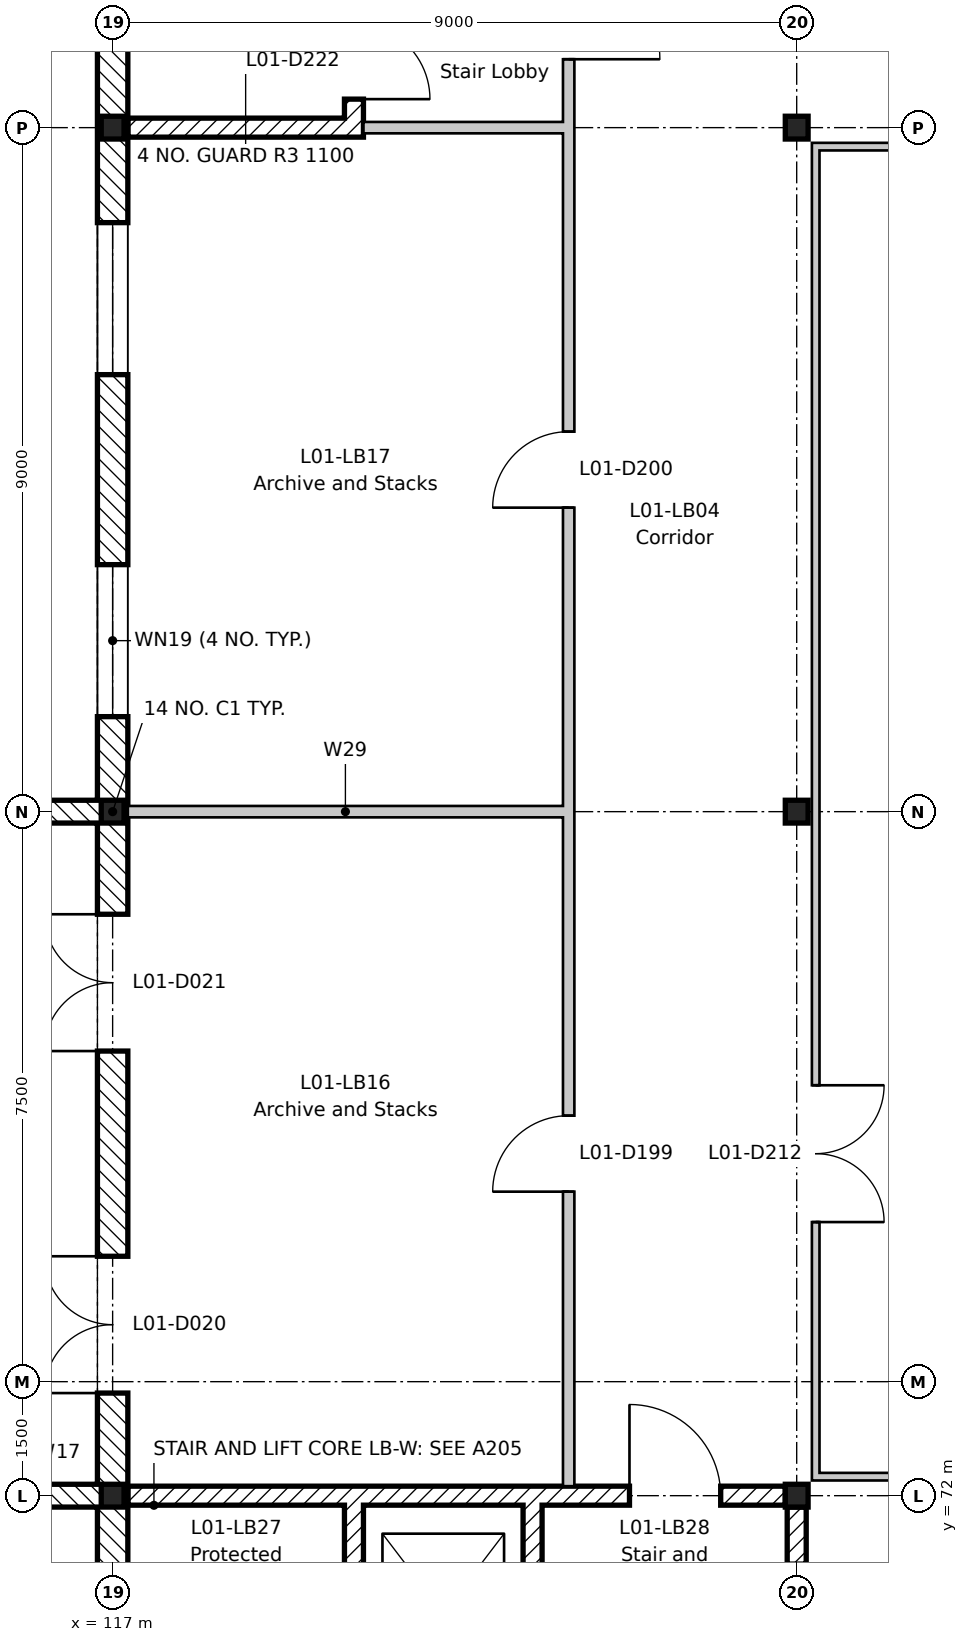
"""IFC4 building model, lengths in metres.
Left out: names, types, materials, properties, quantities, classifications, styles, units other than length and angle.
Written with IfcOpenShell. Run it as: python <this file> out.ifc"""

import sys

from ifc_helpers import new_model, si_unit, direction, frame, frame_2d, origin, origin_2d, place, context, subcontext, project, spatial, rectangle, i_section, extrude, element, fill, save


model = new_model("IFC4")
c1 = context("Model", 3, precision=1e-05, world=origin(), true_north=direction((0.0, 1.0)))
c2 = subcontext(c1, "Body", "Model", "MODEL_VIEW")
j1 = project(units=[si_unit("LENGTHUNIT", "METRE"), si_unit("PLANEANGLEUNIT", "RADIAN")], contexts=[c1])
p1 = place(None, origin())
s1 = spatial("IfcSite", under=j1, at=p1, CompositionType="ELEMENT")
p2 = place(p1, origin())
s2 = spatial("IfcBuilding", under=s1, at=p2, CompositionType="ELEMENT")
p3 = place(p2, frame((0.0, 0.0, 5.4)))
s3 = spatial("IfcBuildingStorey", under=s2, at=p3, CompositionType="ELEMENT", Elevation=5.4)
for number, where, z_axis, x_axis in (
    (1, (117.0, 72.0, -0.2), (0.0, 0.0, 1.0), (1.0, 0.0, 0.0)),
    (2, (117.0, 81.0, -0.2), (0.0, 0.0, 1.0), (1.0, 0.0, 0.0)),
    (3, (117.0, 90.0, -0.2), (0.0, 0.0, 1.0), (1.0, 0.0, 0.0)),
    (4, (126.0, 72.0, -0.2), (0.0, 0.0, 1.0), (1.0, 0.0, 0.0)),
    (5, (126.0, 81.0, -0.2), (0.0, 0.0, 1.0), (1.0, 0.0, 0.0)),
    (6, (126.0, 90.0, -0.2), (0.0, 0.0, 1.0), (1.0, 0.0, 0.0)),
):
    element("IfcColumn", number, at=place(p3, frame(where, z_axis=z_axis, x_axis=x_axis)), inside=s3, PredefinedType="COLUMN", context=c2, shape_type="SweptSolid", body=[
        extrude(i_section(OverallWidth=0.3, OverallDepth=0.3, WebThickness=0.011, FlangeThickness=0.019, FilletRadius=0.027, at=origin_2d()), origin(), (0.0, 0.0, 1.0), 4.5),
    ])
p4 = place(p3, frame((120.175, 63.2, 0.0), z_axis=(0.0, 0.0, 1.0), x_axis=(0.0, 1.0, 0.0)))
e7 = element("IfcWall", 7, at=p4, inside=s3, PredefinedType="SHEAR", context=c2, shape_type="SweptSolid", body=[
    extrude(rectangle(XDim=8.675, YDim=0.25, at=frame_2d((4.337, 0.0))), origin(), (0.0, 0.0, 1.0), 4.3),
])
p5 = place(p4, frame((0.25, 0.0, 0.0)))
e8 = element("IfcOpeningElement", 8, at=p5, cuts=e7, PredefinedType="OPENING", context=c2, shape_type="SweptSolid", body=[
    extrude(rectangle(XDim=1.0, YDim=2.1, at=frame_2d((0.5, 1.05))), frame((0.0, 0.135, 0.0), z_axis=(0.0, -1.0, 0.0), x_axis=(1.0, 0.0, 0.0)), (0.0, 0.0, 1.0), 0.27),
])
p6 = place(p3, frame((126.0, 63.2, 0.0), z_axis=(0.0, 0.0, 1.0), x_axis=(0.0, 1.0, 0.0)))
e9 = element("IfcWall", 9, at=p6, inside=s3, PredefinedType="SHEAR", context=c2, shape_type="SweptSolid", body=[
    extrude(rectangle(XDim=8.65, YDim=0.25, at=frame_2d((4.325, 0.0))), origin(), (0.0, 0.0, 1.0), 4.3),
])
p7 = place(p6, frame((6.7, 0.0, 0.0)))
e10 = element("IfcOpeningElement", 10, at=p7, cuts=e9, PredefinedType="OPENING", context=c2, shape_type="SweptSolid", body=[
    extrude(rectangle(XDim=1.2, YDim=2.1, at=frame_2d((0.6, 1.05))), frame((0.0, 0.135, 0.0), z_axis=(0.0, -1.0, 0.0), x_axis=(1.0, 0.0, 0.0)), (0.0, 0.0, 1.0), 0.27),
])
p8 = place(p3, frame((117.2, 72.0, 0.0), z_axis=(0.0, 0.0, 1.0), x_axis=(1.0, 0.0, 0.0)))
e11 = element("IfcWall", 11, at=p8, inside=s3, PredefinedType="SHEAR", context=c2, shape_type="SweptSolid", body=[
    extrude(rectangle(XDim=8.65, YDim=0.25, at=frame_2d((4.325, 0.0))), origin(), (0.0, 0.0, 1.0), 4.3),
])
p9 = place(p8, frame((6.6, 0.0, 0.0)))
e12 = element("IfcOpeningElement", 12, at=p9, cuts=e11, PredefinedType="OPENING", context=c2, shape_type="SweptSolid", body=[
    extrude(rectangle(XDim=1.2, YDim=2.1, at=frame_2d((0.6, 1.05))), frame((0.0, 0.135, 0.0), z_axis=(0.0, -1.0, 0.0), x_axis=(1.0, 0.0, 0.0)), (0.0, 0.0, 1.0), 0.27),
])
p10 = place(p3, frame((122.525, 69.275, 0.0), z_axis=(0.0, 0.0, 1.0), x_axis=(0.0, 1.0, 0.0)))
e13 = element("IfcWall", 13, at=p10, inside=s3, PredefinedType="SHEAR", context=c2, shape_type="SweptSolid", body=[
    extrude(rectangle(XDim=2.6, YDim=0.25, at=frame_2d((1.3, 0.0))), origin(), (0.0, 0.0, 1.0), 4.3),
])
p11 = place(p3, frame((120.175, 90.125, 0.0), z_axis=(0.0, 0.0, 1.0), x_axis=(0.0, 1.0, 0.0)))
e14 = element("IfcWall", 14, at=p11, inside=s3, PredefinedType="SHEAR", context=c2, shape_type="SweptSolid", body=[
    extrude(rectangle(XDim=8.675, YDim=0.25, at=frame_2d((4.337, 0.0))), origin(), (0.0, 0.0, 1.0), 4.3),
])
p12 = place(p11, frame((0.25, 0.0, 0.0)))
e15 = element("IfcOpeningElement", 15, at=p12, cuts=e14, PredefinedType="OPENING", context=c2, shape_type="SweptSolid", body=[
    extrude(rectangle(XDim=1.0, YDim=2.1, at=frame_2d((0.5, 1.05))), frame((0.0, 0.135, 0.0), z_axis=(0.0, -1.0, 0.0), x_axis=(1.0, 0.0, 0.0)), (0.0, 0.0, 1.0), 0.27),
])
p13 = place(p3, frame((117.2, 90.0, 0.0), z_axis=(0.0, 0.0, 1.0), x_axis=(1.0, 0.0, 0.0)))
e16 = element("IfcWall", 16, at=p13, inside=s3, PredefinedType="SHEAR", context=c2, shape_type="SweptSolid", body=[
    extrude(rectangle(XDim=3.1, YDim=0.25, at=frame_2d((1.55, 0.0))), origin(), (0.0, 0.0, 1.0), 3.8),
])
for number, where, z_axis, x_axis in (
    (17, (116.85, 72.0, 0.0), (0.0, 0.0, 1.0), (-1.0, 0.0, 0.0)),
    (18, (116.85, 81.0, 0.0), (0.0, 0.0, 1.0), (-1.0, 0.0, 0.0)),
):
    element("IfcWall", number, at=place(p3, frame(where, z_axis=z_axis, x_axis=x_axis)), inside=s3, PredefinedType="STANDARD", context=c2, shape_type="SweptSolid", body=[
        extrude(rectangle(XDim=2.25, YDim=0.3, at=frame_2d((1.125, 0.0))), origin(), (0.0, 0.0, 1.0), 3.97),
    ])
p14 = place(p3, frame((117.0, 63.2, 0.0), z_axis=(0.0, 0.0, 1.0), x_axis=(0.0, 1.0, 0.0)))
e19 = element("IfcWall", 19, at=p14, inside=s3, PredefinedType="STANDARD", context=c2, shape_type="SweptSolid", body=[
    extrude(rectangle(XDim=35.6, YDim=0.4, at=frame_2d((17.8, 0.0))), origin(), (0.0, 0.0, 1.0), 4.3),
])
p15 = place(p14, frame((19.05, 0.0, 0.5)))
e20 = element("IfcOpeningElement", 20, at=p15, cuts=e19, PredefinedType="OPENING", context=c2, shape_type="SweptSolid", body=[
    extrude(rectangle(XDim=2.0, YDim=3.2, at=frame_2d((1.0, 1.6))), frame((0.0, 0.21, 0.0), z_axis=(0.0, -1.0, 0.0), x_axis=(1.0, 0.0, 0.0)), (0.0, 0.0, 1.0), 0.42),
])
p16 = place(p14, frame((23.55, 0.0, 0.5)))
e21 = element("IfcOpeningElement", 21, at=p16, cuts=e19, PredefinedType="OPENING", context=c2, shape_type="SweptSolid", body=[
    extrude(rectangle(XDim=2.0, YDim=3.2, at=frame_2d((1.0, 1.6))), frame((0.0, 0.21, 0.0), z_axis=(0.0, -1.0, 0.0), x_axis=(1.0, 0.0, 0.0)), (0.0, 0.0, 1.0), 0.42),
])
p17 = place(p14, frame((28.05, 0.0, 0.5)))
e22 = element("IfcOpeningElement", 22, at=p17, cuts=e19, PredefinedType="OPENING", context=c2, shape_type="SweptSolid", body=[
    extrude(rectangle(XDim=2.0, YDim=3.2, at=frame_2d((1.0, 1.6))), frame((0.0, 0.21, 0.0), z_axis=(0.0, -1.0, 0.0), x_axis=(1.0, 0.0, 0.0)), (0.0, 0.0, 1.0), 0.42),
])
p18 = place(p14, frame((32.55, 0.0, 0.5)))
e23 = element("IfcOpeningElement", 23, at=p18, cuts=e19, PredefinedType="OPENING", context=c2, shape_type="SweptSolid", body=[
    extrude(rectangle(XDim=2.0, YDim=3.2, at=frame_2d((1.0, 1.6))), frame((0.0, 0.21, 0.0), z_axis=(0.0, -1.0, 0.0), x_axis=(1.0, 0.0, 0.0)), (0.0, 0.0, 1.0), 0.42),
])
p19 = place(p14, frame((10.15, 0.0, 0.0)))
e24 = element("IfcOpeningElement", 24, at=p19, cuts=e19, PredefinedType="OPENING", context=c2, shape_type="SweptSolid", body=[
    extrude(rectangle(XDim=1.8, YDim=2.4, at=frame_2d((0.9, 1.2))), frame((0.0, 0.21, 0.0), z_axis=(0.0, -1.0, 0.0), x_axis=(1.0, 0.0, 0.0)), (0.0, 0.0, 1.0), 0.42),
])
p20 = place(p14, frame((14.65, 0.0, 0.0)))
e25 = element("IfcOpeningElement", 25, at=p20, cuts=e19, PredefinedType="OPENING", context=c2, shape_type="SweptSolid", body=[
    extrude(rectangle(XDim=1.8, YDim=2.4, at=frame_2d((0.9, 1.2))), frame((0.0, 0.21, 0.0), z_axis=(0.0, -1.0, 0.0), x_axis=(1.0, 0.0, 0.0)), (0.0, 0.0, 1.0), 0.42),
])
p21 = place(p3, frame((117.2, 81.0, 0.0), z_axis=(0.0, 0.0, 1.0), x_axis=(1.0, 0.0, 0.0)))
e26 = element("IfcWall", 26, at=p21, inside=s3, PredefinedType="PARTITIONING", context=c2, shape_type="SweptSolid", body=[
    extrude(rectangle(XDim=5.725, YDim=0.15, at=frame_2d((2.863, 0.0))), origin(), (0.0, 0.0, 1.0), 3.78),
])
p22 = place(p3, frame((120.3, 90.0, 0.0), z_axis=(0.0, 0.0, 1.0), x_axis=(1.0, 0.0, 0.0)))
e27 = element("IfcWall", 27, at=p22, inside=s3, PredefinedType="PARTITIONING", context=c2, shape_type="SweptSolid", body=[
    extrude(rectangle(XDim=2.625, YDim=0.15, at=frame_2d((1.312, 0.0))), origin(), (0.0, 0.0, 1.0), 3.78),
])
p23 = place(p3, frame((123.0, 72.125, 0.0), z_axis=(0.0, 0.0, 1.0), x_axis=(0.0, 1.0, 0.0)))
e28 = element("IfcWall", 28, at=p23, inside=s3, PredefinedType="PARTITIONING", context=c2, shape_type="SweptSolid", body=[
    extrude(rectangle(XDim=20.8, YDim=0.15, at=frame_2d((10.4, 0.0))), origin(), (0.0, 0.0, 1.0), 3.78),
])
p24 = place(p23, frame((3.875, 0.0, 0.0)))
e29 = element("IfcOpeningElement", 29, at=p24, cuts=e28, PredefinedType="OPENING", context=c2, shape_type="SweptSolid", body=[
    extrude(rectangle(XDim=1.0, YDim=2.1, at=frame_2d((0.5, 1.05))), frame((0.0, 0.085, 0.0), z_axis=(0.0, -1.0, 0.0), x_axis=(1.0, 0.0, 0.0)), (0.0, 0.0, 1.0), 0.17),
])
p25 = place(p23, frame((12.875, 0.0, 0.0)))
e30 = element("IfcOpeningElement", 30, at=p25, cuts=e28, PredefinedType="OPENING", context=c2, shape_type="SweptSolid", body=[
    extrude(rectangle(XDim=1.0, YDim=2.1, at=frame_2d((0.5, 1.05))), frame((0.0, 0.085, 0.0), z_axis=(0.0, -1.0, 0.0), x_axis=(1.0, 0.0, 0.0)), (0.0, 0.0, 1.0), 0.17),
])
p26 = place(p23, frame((18.775, 0.0, 0.0)))
e31 = element("IfcOpeningElement", 31, at=p26, cuts=e28, PredefinedType="OPENING", context=c2, shape_type="SweptSolid", body=[
    extrude(rectangle(XDim=1.2, YDim=2.1, at=frame_2d((0.6, 1.05))), frame((0.0, 0.085, 0.0), z_axis=(0.0, -1.0, 0.0), x_axis=(1.0, 0.0, 0.0)), (0.0, 0.0, 1.0), 0.17),
])
p27 = place(p3, frame((126.2, 72.25, 0.0), z_axis=(0.0, 0.0, 1.0), x_axis=(1.0, 0.0, 0.0)))
e32 = element("IfcWall", 32, at=p27, inside=s3, PredefinedType="PARTITIONING", context=c2, shape_type="SweptSolid", body=[
    extrude(rectangle(XDim=35.6, YDim=0.1, at=frame_2d((17.8, 0.0))), origin(), (0.0, 0.0, 1.0), 4.3),
])
p28 = place(p27, frame((3.4, 0.0, 0.0)))
e33 = element("IfcOpeningElement", 33, at=p28, cuts=e32, PredefinedType="OPENING", context=c2, shape_type="SweptSolid", body=[
    extrude(rectangle(XDim=1.8, YDim=2.1, at=frame_2d((0.9, 1.05))), frame((0.0, 0.06, 0.0), z_axis=(0.0, -1.0, 0.0), x_axis=(1.0, 0.0, 0.0)), (0.0, 0.0, 1.0), 0.12),
])
p29 = place(p27, frame((13.9, 0.0, 0.0)))
e34 = element("IfcOpeningElement", 34, at=p29, cuts=e32, PredefinedType="OPENING", context=c2, shape_type="SweptSolid", body=[
    extrude(rectangle(XDim=1.8, YDim=2.1, at=frame_2d((0.9, 1.05))), frame((0.0, 0.06, 0.0), z_axis=(0.0, -1.0, 0.0), x_axis=(1.0, 0.0, 0.0)), (0.0, 0.0, 1.0), 0.12),
])
p30 = place(p3, frame((126.2, 89.75, 0.0), z_axis=(0.0, 0.0, 1.0), x_axis=(1.0, 0.0, 0.0)))
e35 = element("IfcWall", 35, at=p30, inside=s3, PredefinedType="PARTITIONING", context=c2, shape_type="SweptSolid", body=[
    extrude(rectangle(XDim=35.6, YDim=0.1, at=frame_2d((17.8, 0.0))), origin(), (0.0, 0.0, 1.0), 4.3),
])
p31 = place(p30, frame((21.4, 0.0, 0.0)))
e36 = element("IfcOpeningElement", 36, at=p31, cuts=e35, PredefinedType="OPENING", context=c2, shape_type="SweptSolid", body=[
    extrude(rectangle(XDim=1.8, YDim=2.1, at=frame_2d((0.9, 1.05))), frame((0.0, 0.06, 0.0), z_axis=(0.0, -1.0, 0.0), x_axis=(1.0, 0.0, 0.0)), (0.0, 0.0, 1.0), 0.12),
])
p32 = place(p30, frame((30.4, 0.0, 0.0)))
e37 = element("IfcOpeningElement", 37, at=p32, cuts=e35, PredefinedType="OPENING", context=c2, shape_type="SweptSolid", body=[
    extrude(rectangle(XDim=1.8, YDim=2.1, at=frame_2d((0.9, 1.05))), frame((0.0, 0.06, 0.0), z_axis=(0.0, -1.0, 0.0), x_axis=(1.0, 0.0, 0.0)), (0.0, 0.0, 1.0), 0.12),
])
p33 = place(p3, frame((126.25, 72.3, 0.0), z_axis=(0.0, 0.0, 1.0), x_axis=(0.0, 1.0, 0.0)))
e38 = element("IfcWall", 38, at=p33, inside=s3, PredefinedType="PARTITIONING", context=c2, shape_type="SweptSolid", body=[
    extrude(rectangle(XDim=17.4, YDim=0.1, at=frame_2d((8.7, 0.0))), origin(), (0.0, 0.0, 1.0), 4.3),
])
p34 = place(p33, frame((3.3, 0.0, 0.0)))
e39 = element("IfcOpeningElement", 39, at=p34, cuts=e38, PredefinedType="OPENING", context=c2, shape_type="SweptSolid", body=[
    extrude(rectangle(XDim=1.8, YDim=2.1, at=frame_2d((0.9, 1.05))), frame((0.0, 0.06, 0.0), z_axis=(0.0, -1.0, 0.0), x_axis=(1.0, 0.0, 0.0)), (0.0, 0.0, 1.0), 0.12),
])
p35 = place(p15, origin())
e40 = element("IfcWindow", 40, at=p35, inside=s3, PartitioningType="SINGLE_PANEL", PredefinedType="WINDOW", context=c2, shape_type="SweptSolid", body=[
    extrude(rectangle(XDim=2.0, YDim=3.2, at=frame_2d((1.0, 1.6))), frame((0.0, 0.03, 0.0), z_axis=(0.0, -1.0, 0.0), x_axis=(1.0, 0.0, 0.0)), (0.0, 0.0, 1.0), 0.06),
])
fill(e20, e40)
p36 = place(p16, origin())
e41 = element("IfcWindow", 41, at=p36, inside=s3, PartitioningType="SINGLE_PANEL", PredefinedType="WINDOW", context=c2, shape_type="SweptSolid", body=[
    extrude(rectangle(XDim=2.0, YDim=3.2, at=frame_2d((1.0, 1.6))), frame((0.0, 0.03, 0.0), z_axis=(0.0, -1.0, 0.0), x_axis=(1.0, 0.0, 0.0)), (0.0, 0.0, 1.0), 0.06),
])
fill(e21, e41)
p37 = place(p19, origin())
e42 = element("IfcDoor", 42, at=p37, inside=s3, OperationType="DOUBLE_DOOR_SINGLE_SWING", PredefinedType="DOOR", context=c2, shape_type="SweptSolid", body=[
    extrude(rectangle(XDim=1.8, YDim=2.4, at=frame_2d((0.9, 1.2))), frame((0.0, 0.025, 0.0), z_axis=(0.0, -1.0, 0.0), x_axis=(1.0, 0.0, 0.0)), (0.0, 0.0, 1.0), 0.05),
])
fill(e24, e42)
p38 = place(p20, origin())
e43 = element("IfcDoor", 43, at=p38, inside=s3, OperationType="DOUBLE_DOOR_SINGLE_SWING", PredefinedType="DOOR", context=c2, shape_type="SweptSolid", body=[
    extrude(rectangle(XDim=1.8, YDim=2.4, at=frame_2d((0.9, 1.2))), frame((0.0, 0.025, 0.0), z_axis=(0.0, -1.0, 0.0), x_axis=(1.0, 0.0, 0.0)), (0.0, 0.0, 1.0), 0.05),
])
fill(e25, e43)
p39 = place(p24, origin())
e44 = element("IfcDoor", 44, at=p39, inside=s3, OperationType="SINGLE_SWING_LEFT", PredefinedType="DOOR", context=c2, shape_type="SweptSolid", body=[
    extrude(rectangle(XDim=1.0, YDim=2.1, at=frame_2d((0.5, 1.05))), frame((0.0, 0.025, 0.0), z_axis=(0.0, -1.0, 0.0), x_axis=(1.0, 0.0, 0.0)), (0.0, 0.0, 1.0), 0.05),
])
fill(e29, e44)
p40 = place(p25, origin())
e45 = element("IfcDoor", 45, at=p40, inside=s3, OperationType="SINGLE_SWING_LEFT", PredefinedType="DOOR", context=c2, shape_type="SweptSolid", body=[
    extrude(rectangle(XDim=1.0, YDim=2.1, at=frame_2d((0.5, 1.05))), frame((0.0, 0.025, 0.0), z_axis=(0.0, -1.0, 0.0), x_axis=(1.0, 0.0, 0.0)), (0.0, 0.0, 1.0), 0.05),
])
fill(e30, e45)
p41 = place(p26, frame((1.2, 0.0, 0.0), z_axis=(0.0, 0.0, 1.0), x_axis=(-1.0, 0.0, 0.0)))
e46 = element("IfcDoor", 46, at=p41, inside=s3, OperationType="SINGLE_SWING_RIGHT", PredefinedType="DOOR", context=c2, shape_type="SweptSolid", body=[
    extrude(rectangle(XDim=1.2, YDim=2.1, at=frame_2d((0.6, 1.05))), frame((0.0, 0.025, 0.0), z_axis=(0.0, -1.0, 0.0), x_axis=(1.0, 0.0, 0.0)), (0.0, 0.0, 1.0), 0.05),
])
fill(e31, e46)
p42 = place(p34, frame((1.8, 0.0, 0.0), z_axis=(0.0, 0.0, 1.0), x_axis=(-1.0, 0.0, 0.0)))
e47 = element("IfcDoor", 47, at=p42, inside=s3, OperationType="DOUBLE_DOOR_SINGLE_SWING", PredefinedType="DOOR", context=c2, shape_type="SweptSolid", body=[
    extrude(rectangle(XDim=1.8, YDim=2.1, at=frame_2d((0.9, 1.05))), frame((0.0, 0.025, 0.0), z_axis=(0.0, -1.0, 0.0), x_axis=(1.0, 0.0, 0.0)), (0.0, 0.0, 1.0), 0.05),
])
fill(e39, e47)
p43 = place(p9, origin())
e48 = element("IfcDoor", 48, at=p43, inside=s3, OperationType="SINGLE_SWING_LEFT", PredefinedType="DOOR", context=c2, shape_type="SweptSolid", body=[
    extrude(rectangle(XDim=1.2, YDim=2.1, at=frame_2d((0.6, 1.05))), frame((0.0, 0.025, 0.0), z_axis=(0.0, -1.0, 0.0), x_axis=(1.0, 0.0, 0.0)), (0.0, 0.0, 1.0), 0.05),
])
fill(e12, e48)
p44 = place(p12, frame((1.0, 0.0, 0.0), z_axis=(0.0, 0.0, 1.0), x_axis=(-1.0, 0.0, 0.0)))
e49 = element("IfcDoor", 49, at=p44, inside=s3, OperationType="SINGLE_SWING_RIGHT", PredefinedType="DOOR", context=c2, shape_type="SweptSolid", body=[
    extrude(rectangle(XDim=1.0, YDim=2.1, at=frame_2d((0.5, 1.05))), frame((0.0, 0.025, 0.0), z_axis=(0.0, -1.0, 0.0), x_axis=(1.0, 0.0, 0.0)), (0.0, 0.0, 1.0), 0.05),
])
fill(e15, e49)
save(model, sys.argv[1])
